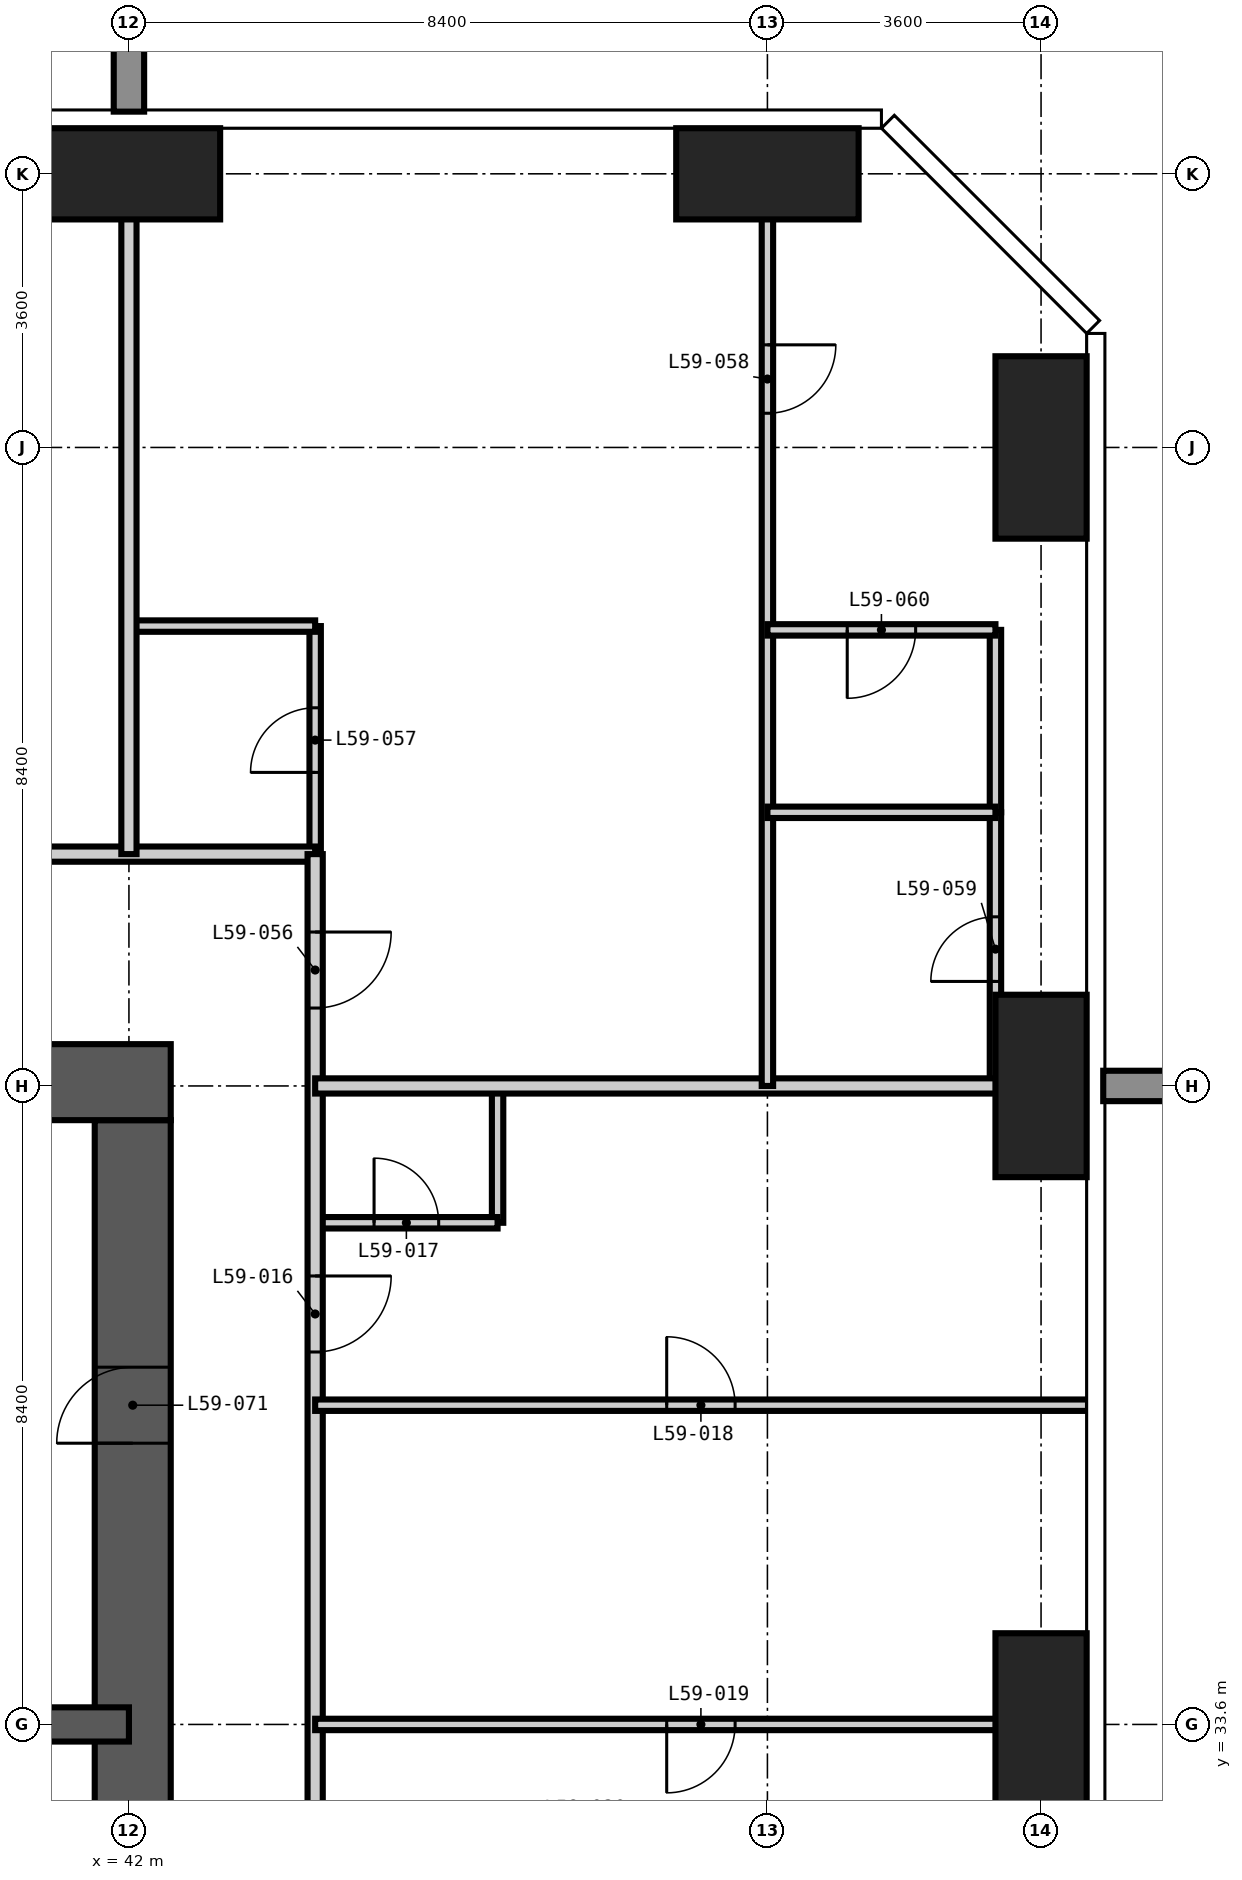
"""IFC4 building model, lengths in metres.
Left out: names, types, materials, properties, quantities, classifications, styles, units other than length and angle.
Written with IfcOpenShell. Run it as: python <this file> out.ifc"""

import sys

from ifc_helpers import new_model, si_unit, direction, frame, frame_2d, origin, origin_2d, place, context, subcontext, project, spatial, rectangle, extrude, element, fill, save


model = new_model("IFC4")
c1 = context("Model", 3, precision=1e-05, world=origin(), true_north=direction((0.0, 1.0)))
c2 = subcontext(c1, "Body", "Model", "MODEL_VIEW")
j1 = project(units=[si_unit("LENGTHUNIT", "METRE"), si_unit("PLANEANGLEUNIT", "RADIAN")], contexts=[c1])
p1 = place(None, origin())
s1 = spatial("IfcSite", under=j1, at=p1, CompositionType="ELEMENT")
p2 = place(p1, origin())
s2 = spatial("IfcBuilding", under=s1, at=p2, CompositionType="ELEMENT")
p3 = place(p2, frame((0.0, 0.0, 229.5)))
s3 = spatial("IfcBuildingStorey", under=s2, at=p3, CompositionType="ELEMENT", Elevation=229.5)
for number, where, z_axis, x_axis in (
    (1, (42.0, 54.0, -0.35), (0.0, 0.0, 1.0), (1.0, 0.0, 0.0)),
    (2, (50.4, 54.0, -0.35), (0.0, 0.0, 1.0), (1.0, 0.0, 0.0)),
):
    element("IfcColumn", number, at=place(p3, frame(where, z_axis=z_axis, x_axis=x_axis)), inside=s3, PredefinedType="COLUMN", context=c2, shape_type="SweptSolid", body=[
        extrude(rectangle(XDim=2.4, YDim=1.2, at=origin_2d()), origin(), (0.0, 0.0, 1.0), 3.9),
    ])
for number, where, z_axis, x_axis in (
    (3, (54.0, 33.6, -0.35), (0.0, 0.0, 1.0), (1.0, 0.0, 0.0)),
    (4, (54.0, 42.0, -0.35), (0.0, 0.0, 1.0), (1.0, 0.0, 0.0)),
    (5, (54.0, 50.4, -0.35), (0.0, 0.0, 1.0), (1.0, 0.0, 0.0)),
):
    element("IfcColumn", number, at=place(p3, frame(where, z_axis=z_axis, x_axis=x_axis)), inside=s3, PredefinedType="COLUMN", context=c2, shape_type="SweptSolid", body=[
        extrude(rectangle(XDim=1.2, YDim=2.4, at=origin_2d()), origin(), (0.0, 0.0, 1.0), 3.9),
    ])
p4 = place(p3, frame((42.05, 17.25, -0.35), z_axis=(0.0, 0.0, 1.0), x_axis=(0.0, 1.0, 0.0)))
e6 = element("IfcWall", 6, at=p4, inside=s3, PredefinedType="SHEAR", context=c2, shape_type="SweptSolid", body=[
    extrude(rectangle(XDim=24.3, YDim=1.0, at=frame_2d((12.15, 0.0))), origin(), (0.0, 0.0, 1.0), 3.9),
])
p5 = place(p4, frame((0.35, 0.0, 0.35)))
e7 = element("IfcOpeningElement", 7, at=p5, cuts=e6, PredefinedType="OPENING", context=c2, shape_type="SweptSolid", body=[
    extrude(rectangle(XDim=1.2, YDim=2.2, at=frame_2d((0.6, 1.1))), frame((0.0, 0.51, 0.0), z_axis=(0.0, -1.0, 0.0), x_axis=(1.0, 0.0, 0.0)), (0.0, 0.0, 1.0), 1.02),
])
p6 = place(p4, frame((11.25, 0.0, 0.35)))
e8 = element("IfcOpeningElement", 8, at=p6, cuts=e6, PredefinedType="OPENING", context=c2, shape_type="SweptSolid", body=[
    extrude(rectangle(XDim=1.8, YDim=2.2, at=frame_2d((0.9, 1.1))), frame((0.0, 0.51, 0.0), z_axis=(0.0, -1.0, 0.0), x_axis=(1.0, 0.0, 0.0)), (0.0, 0.0, 1.0), 1.02),
])
p7 = place(p4, frame((20.05, 0.0, 0.35)))
e9 = element("IfcOpeningElement", 9, at=p7, cuts=e6, PredefinedType="OPENING", context=c2, shape_type="SweptSolid", body=[
    extrude(rectangle(XDim=1.0, YDim=2.1, at=frame_2d((0.5, 1.05))), frame((0.0, 0.51, 0.0), z_axis=(0.0, -1.0, 0.0), x_axis=(1.0, 0.0, 0.0)), (0.0, 0.0, 1.0), 1.02),
])
p8 = place(p3, frame((42.55, 42.05, -0.35), z_axis=(0.0, 0.0, 1.0), x_axis=(-1.0, 0.0, 0.0)))
e10 = element("IfcWall", 10, at=p8, inside=s3, PredefinedType="SHEAR", context=c2, shape_type="SweptSolid", body=[
    extrude(rectangle(XDim=18.125, YDim=1.0, at=frame_2d((9.062, 0.0))), origin(), (0.0, 0.0, 1.0), 3.9),
])
p9 = place(p8, frame((10.45, 0.0, 0.35)))
e11 = element("IfcOpeningElement", 11, at=p9, cuts=e10, PredefinedType="OPENING", context=c2, shape_type="SweptSolid", body=[
    extrude(rectangle(XDim=1.2, YDim=2.2, at=frame_2d((0.6, 1.1))), frame((0.0, 0.51, 0.0), z_axis=(0.0, -1.0, 0.0), x_axis=(1.0, 0.0, 0.0)), (0.0, 0.0, 1.0), 1.02),
])
p10 = place(p3, frame((25.2, 33.6, -0.35), z_axis=(0.0, 0.0, 1.0), x_axis=(1.0, 0.0, 0.0)))
e12 = element("IfcWall", 12, at=p10, inside=s3, PredefinedType="SHEAR", context=c2, shape_type="SweptSolid", body=[
    extrude(rectangle(XDim=16.8, YDim=0.45, at=frame_2d((8.4, 0.0))), origin(), (0.0, 0.0, 1.0), 3.9),
])
p11 = place(p3, frame((44.45, 45.05, 0.0), z_axis=(0.0, 0.0, 1.0), x_axis=(0.0, 1.0, 0.0)))
e13 = element("IfcWall", 13, at=p11, inside=s3, PredefinedType="PARTITIONING", context=c2, shape_type="SweptSolid", body=[
    extrude(rectangle(XDim=3.0, YDim=0.15, at=frame_2d((1.5, 0.0))), origin(), (0.0, 0.0, 1.0), 3.55),
])
p12 = place(p11, frame((1.075, 0.0, 0.0)))
e14 = element("IfcOpeningElement", 14, at=p12, cuts=e13, PredefinedType="OPENING", context=c2, shape_type="SweptSolid", body=[
    extrude(rectangle(XDim=0.85, YDim=2.1, at=frame_2d((0.425, 1.05))), frame((0.0, 0.085, 0.0), z_axis=(0.0, -1.0, 0.0), x_axis=(1.0, 0.0, 0.0)), (0.0, 0.0, 1.0), 0.17),
])
p13 = place(p3, frame((46.85, 40.2, 0.0), z_axis=(0.0, 0.0, 1.0), x_axis=(0.0, 1.0, 0.0)))
e15 = element("IfcWall", 15, at=p13, inside=s3, PredefinedType="PARTITIONING", context=c2, shape_type="SweptSolid", body=[
    extrude(rectangle(XDim=1.8, YDim=0.15, at=frame_2d((0.9, 0.0))), origin(), (0.0, 0.0, 1.0), 3.55),
])
p14 = place(p3, frame((53.4, 42.0, 0.0), z_axis=(0.0, 0.0, 1.0), x_axis=(0.0, 1.0, 0.0)))
e16 = element("IfcWall", 16, at=p14, inside=s3, PredefinedType="PARTITIONING", context=c2, shape_type="SweptSolid", body=[
    extrude(rectangle(XDim=3.6, YDim=0.15, at=frame_2d((1.8, 0.0))), origin(), (0.0, 0.0, 1.0), 3.55),
])
p15 = place(p14, frame((1.375, 0.0, 0.0)))
e17 = element("IfcOpeningElement", 17, at=p15, cuts=e16, PredefinedType="OPENING", context=c2, shape_type="SweptSolid", body=[
    extrude(rectangle(XDim=0.85, YDim=2.1, at=frame_2d((0.425, 1.05))), frame((0.0, 0.085, 0.0), z_axis=(0.0, -1.0, 0.0), x_axis=(1.0, 0.0, 0.0)), (0.0, 0.0, 1.0), 0.17),
])
p16 = place(p3, frame((44.45, 40.2, 0.0), z_axis=(0.0, 0.0, 1.0), x_axis=(1.0, 0.0, 0.0)))
e18 = element("IfcWall", 18, at=p16, inside=s3, PredefinedType="PARTITIONING", context=c2, shape_type="SweptSolid", body=[
    extrude(rectangle(XDim=2.4, YDim=0.15, at=frame_2d((1.2, 0.0))), origin(), (0.0, 0.0, 1.0), 3.55),
])
p17 = place(p16, frame((0.775, 0.0, 0.0)))
e19 = element("IfcOpeningElement", 19, at=p17, cuts=e18, PredefinedType="OPENING", context=c2, shape_type="SweptSolid", body=[
    extrude(rectangle(XDim=0.85, YDim=2.1, at=frame_2d((0.425, 1.05))), frame((0.0, 0.085, 0.0), z_axis=(0.0, -1.0, 0.0), x_axis=(1.0, 0.0, 0.0)), (0.0, 0.0, 1.0), 0.17),
])
p18 = place(p3, frame((42.0, 48.05, 0.0), z_axis=(0.0, 0.0, 1.0), x_axis=(1.0, 0.0, 0.0)))
e20 = element("IfcWall", 20, at=p18, inside=s3, PredefinedType="PARTITIONING", context=c2, shape_type="SweptSolid", body=[
    extrude(rectangle(XDim=2.45, YDim=0.15, at=frame_2d((1.225, 0.0))), origin(), (0.0, 0.0, 1.0), 3.55),
])
p19 = place(p3, frame((21.325, 45.05, 0.0), z_axis=(0.0, 0.0, 1.0), x_axis=(1.0, 0.0, 0.0)))
e21 = element("IfcWall", 21, at=p19, inside=s3, PredefinedType="PARTITIONING", context=c2, shape_type="SweptSolid", body=[
    extrude(rectangle(XDim=23.125, YDim=0.2, at=frame_2d((11.562, 0.0))), origin(), (0.0, 0.0, 1.0), 3.55),
])
p20 = place(p19, frame((5.475, 0.0, 0.0)))
e22 = element("IfcOpeningElement", 22, at=p20, cuts=e21, PredefinedType="OPENING", context=c2, shape_type="SweptSolid", body=[
    extrude(rectangle(XDim=1.0, YDim=2.2, at=frame_2d((0.5, 1.1))), frame((0.0, 0.11, 0.0), z_axis=(0.0, -1.0, 0.0), x_axis=(1.0, 0.0, 0.0)), (0.0, 0.0, 1.0), 0.22),
])
p21 = place(p19, frame((11.775, 0.0, 0.0)))
e23 = element("IfcOpeningElement", 23, at=p21, cuts=e21, PredefinedType="OPENING", context=c2, shape_type="SweptSolid", body=[
    extrude(rectangle(XDim=1.0, YDim=2.2, at=frame_2d((0.5, 1.1))), frame((0.0, 0.11, 0.0), z_axis=(0.0, -1.0, 0.0), x_axis=(1.0, 0.0, 0.0)), (0.0, 0.0, 1.0), 0.22),
])
p22 = place(p19, frame((18.075, 0.0, 0.0)))
e24 = element("IfcOpeningElement", 24, at=p22, cuts=e21, PredefinedType="OPENING", context=c2, shape_type="SweptSolid", body=[
    extrude(rectangle(XDim=1.0, YDim=2.2, at=frame_2d((0.5, 1.1))), frame((0.0, 0.11, 0.0), z_axis=(0.0, -1.0, 0.0), x_axis=(1.0, 0.0, 0.0)), (0.0, 0.0, 1.0), 0.22),
])
p23 = place(p3, frame((44.45, 45.05, 0.0), z_axis=(0.0, 0.0, 1.0), x_axis=(0.0, -1.0, 0.0)))
e25 = element("IfcWall", 25, at=p23, inside=s3, PredefinedType="PARTITIONING", context=c2, shape_type="SweptSolid", body=[
    extrude(rectangle(XDim=15.65, YDim=0.2, at=frame_2d((7.825, 0.0))), origin(), (0.0, 0.0, 1.0), 3.55),
])
p24 = place(p23, frame((5.55, 0.0, 0.0)))
e26 = element("IfcOpeningElement", 26, at=p24, cuts=e25, PredefinedType="OPENING", context=c2, shape_type="SweptSolid", body=[
    extrude(rectangle(XDim=1.0, YDim=2.2, at=frame_2d((0.5, 1.1))), frame((0.0, 0.11, 0.0), z_axis=(0.0, -1.0, 0.0), x_axis=(1.0, 0.0, 0.0)), (0.0, 0.0, 1.0), 0.22),
])
p25 = place(p23, frame((1.025, 0.0, 0.0)))
e27 = element("IfcOpeningElement", 27, at=p25, cuts=e25, PredefinedType="OPENING", context=c2, shape_type="SweptSolid", body=[
    extrude(rectangle(XDim=1.0, YDim=2.2, at=frame_2d((0.5, 1.1))), frame((0.0, 0.11, 0.0), z_axis=(0.0, -1.0, 0.0), x_axis=(1.0, 0.0, 0.0)), (0.0, 0.0, 1.0), 0.22),
])
p26 = place(p3, frame((42.0, 45.05, 0.0), z_axis=(0.0, 0.0, 1.0), x_axis=(0.0, 1.0, 0.0)))
e28 = element("IfcWall", 28, at=p26, inside=s3, PredefinedType="PARTITIONING", context=c2, shape_type="SweptSolid", body=[
    extrude(rectangle(XDim=9.568, YDim=0.2, at=frame_2d((4.784, 0.0))), origin(), (0.0, 0.0, 1.0), 3.55),
])
p27 = place(p3, frame((44.45, 42.0, 0.0), z_axis=(0.0, 0.0, 1.0), x_axis=(1.0, 0.0, 0.0)))
e29 = element("IfcWall", 29, at=p27, inside=s3, PredefinedType="PARTITIONING", context=c2, shape_type="SweptSolid", body=[
    extrude(rectangle(XDim=10.168, YDim=0.2, at=frame_2d((5.084, 0.0))), origin(), (0.0, 0.0, 1.0), 3.55),
])
p28 = place(p3, frame((50.4, 42.0, 0.0), z_axis=(0.0, 0.0, 1.0), x_axis=(0.0, 1.0, 0.0)))
e30 = element("IfcWall", 30, at=p28, inside=s3, PredefinedType="PARTITIONING", context=c2, shape_type="SweptSolid", body=[
    extrude(rectangle(XDim=12.618, YDim=0.15, at=frame_2d((6.309, 0.0))), origin(), (0.0, 0.0, 1.0), 3.55),
])
p29 = place(p28, frame((8.85, 0.0, 0.0)))
e31 = element("IfcOpeningElement", 31, at=p29, cuts=e30, PredefinedType="OPENING", context=c2, shape_type="SweptSolid", body=[
    extrude(rectangle(XDim=0.9, YDim=2.1, at=frame_2d((0.45, 1.05))), frame((0.0, 0.085, 0.0), z_axis=(0.0, -1.0, 0.0), x_axis=(1.0, 0.0, 0.0)), (0.0, 0.0, 1.0), 0.17),
])
p30 = place(p3, frame((53.4, 45.6, 0.0), z_axis=(0.0, 0.0, 1.0), x_axis=(0.0, 1.0, 0.0)))
e32 = element("IfcWall", 32, at=p30, inside=s3, PredefinedType="PARTITIONING", context=c2, shape_type="SweptSolid", body=[
    extrude(rectangle(XDim=2.4, YDim=0.15, at=frame_2d((1.2, 0.0))), origin(), (0.0, 0.0, 1.0), 3.55),
])
p31 = place(p3, frame((44.45, 33.6, 0.0), z_axis=(0.0, 0.0, 1.0), x_axis=(1.0, 0.0, 0.0)))
e33 = element("IfcWall", 33, at=p31, inside=s3, PredefinedType="PARTITIONING", context=c2, shape_type="SweptSolid", body=[
    extrude(rectangle(XDim=10.168, YDim=0.15, at=frame_2d((5.084, 0.0))), origin(), (0.0, 0.0, 1.0), 3.55),
])
p32 = place(p31, frame((4.625, 0.0, 0.0)))
e34 = element("IfcOpeningElement", 34, at=p32, cuts=e33, PredefinedType="OPENING", context=c2, shape_type="SweptSolid", body=[
    extrude(rectangle(XDim=0.9, YDim=2.1, at=frame_2d((0.45, 1.05))), frame((0.0, 0.085, 0.0), z_axis=(0.0, -1.0, 0.0), x_axis=(1.0, 0.0, 0.0)), (0.0, 0.0, 1.0), 0.17),
])
p33 = place(p3, frame((44.45, 37.8, 0.0), z_axis=(0.0, 0.0, 1.0), x_axis=(1.0, 0.0, 0.0)))
e35 = element("IfcWall", 35, at=p33, inside=s3, PredefinedType="PARTITIONING", context=c2, shape_type="SweptSolid", body=[
    extrude(rectangle(XDim=10.168, YDim=0.15, at=frame_2d((5.084, 0.0))), origin(), (0.0, 0.0, 1.0), 3.55),
])
p34 = place(p33, frame((4.625, 0.0, 0.0)))
e36 = element("IfcOpeningElement", 36, at=p34, cuts=e35, PredefinedType="OPENING", context=c2, shape_type="SweptSolid", body=[
    extrude(rectangle(XDim=0.9, YDim=2.1, at=frame_2d((0.45, 1.05))), frame((0.0, 0.085, 0.0), z_axis=(0.0, -1.0, 0.0), x_axis=(1.0, 0.0, 0.0)), (0.0, 0.0, 1.0), 0.17),
])
p35 = place(p3, frame((50.4, 45.6, 0.0), z_axis=(0.0, 0.0, 1.0), x_axis=(1.0, 0.0, 0.0)))
e37 = element("IfcWall", 37, at=p35, inside=s3, PredefinedType="PARTITIONING", context=c2, shape_type="SweptSolid", body=[
    extrude(rectangle(XDim=3.0, YDim=0.15, at=frame_2d((1.5, 0.0))), origin(), (0.0, 0.0, 1.0), 3.55),
])
p36 = place(p3, frame((50.4, 48.0, 0.0), z_axis=(0.0, 0.0, 1.0), x_axis=(1.0, 0.0, 0.0)))
e38 = element("IfcWall", 38, at=p36, inside=s3, PredefinedType="PARTITIONING", context=c2, shape_type="SweptSolid", body=[
    extrude(rectangle(XDim=3.0, YDim=0.15, at=frame_2d((1.5, 0.0))), origin(), (0.0, 0.0, 1.0), 3.55),
])
p37 = place(p36, frame((1.05, 0.0, 0.0)))
e39 = element("IfcOpeningElement", 39, at=p37, cuts=e38, PredefinedType="OPENING", context=c2, shape_type="SweptSolid", body=[
    extrude(rectangle(XDim=0.9, YDim=2.1, at=frame_2d((0.45, 1.05))), frame((0.0, 0.085, 0.0), z_axis=(0.0, -1.0, 0.0), x_axis=(1.0, 0.0, 0.0)), (0.0, 0.0, 1.0), 0.17),
])
p38 = place(p24, origin())
e40 = element("IfcDoor", 40, at=p38, inside=s3, OperationType="SINGLE_SWING_LEFT", PredefinedType="DOOR", context=c2, shape_type="SweptSolid", body=[
    extrude(rectangle(XDim=1.0, YDim=2.2, at=frame_2d((0.5, 1.1))), frame((0.0, 0.025, 0.0), z_axis=(0.0, -1.0, 0.0), x_axis=(1.0, 0.0, 0.0)), (0.0, 0.0, 1.0), 0.05),
])
fill(e26, e40)
p39 = place(p17, origin())
e41 = element("IfcDoor", 41, at=p39, inside=s3, OperationType="SINGLE_SWING_LEFT", PredefinedType="DOOR", context=c2, shape_type="SweptSolid", body=[
    extrude(rectangle(XDim=0.85, YDim=2.1, at=frame_2d((0.425, 1.05))), frame((0.0, 0.025, 0.0), z_axis=(0.0, -1.0, 0.0), x_axis=(1.0, 0.0, 0.0)), (0.0, 0.0, 1.0), 0.05),
])
fill(e19, e41)
p40 = place(p34, origin())
e42 = element("IfcDoor", 42, at=p40, inside=s3, OperationType="SINGLE_SWING_LEFT", PredefinedType="DOOR", context=c2, shape_type="SweptSolid", body=[
    extrude(rectangle(XDim=0.9, YDim=2.1, at=frame_2d((0.45, 1.05))), frame((0.0, 0.025, 0.0), z_axis=(0.0, -1.0, 0.0), x_axis=(1.0, 0.0, 0.0)), (0.0, 0.0, 1.0), 0.05),
])
fill(e36, e42)
p41 = place(p32, frame((0.9, 0.0, 0.0), z_axis=(0.0, 0.0, 1.0), x_axis=(-1.0, 0.0, 0.0)))
e43 = element("IfcDoor", 43, at=p41, inside=s3, OperationType="SINGLE_SWING_RIGHT", PredefinedType="DOOR", context=c2, shape_type="SweptSolid", body=[
    extrude(rectangle(XDim=0.9, YDim=2.1, at=frame_2d((0.45, 1.05))), frame((0.0, 0.025, 0.0), z_axis=(0.0, -1.0, 0.0), x_axis=(1.0, 0.0, 0.0)), (0.0, 0.0, 1.0), 0.05),
])
fill(e34, e43)
p42 = place(p25, origin())
e44 = element("IfcDoor", 44, at=p42, inside=s3, OperationType="SINGLE_SWING_LEFT", PredefinedType="DOOR", context=c2, shape_type="SweptSolid", body=[
    extrude(rectangle(XDim=1.0, YDim=2.2, at=frame_2d((0.5, 1.1))), frame((0.0, 0.025, 0.0), z_axis=(0.0, -1.0, 0.0), x_axis=(1.0, 0.0, 0.0)), (0.0, 0.0, 1.0), 0.05),
])
fill(e27, e44)
p43 = place(p12, origin())
e45 = element("IfcDoor", 45, at=p43, inside=s3, OperationType="SINGLE_SWING_LEFT", PredefinedType="DOOR", context=c2, shape_type="SweptSolid", body=[
    extrude(rectangle(XDim=0.85, YDim=2.1, at=frame_2d((0.425, 1.05))), frame((0.0, 0.025, 0.0), z_axis=(0.0, -1.0, 0.0), x_axis=(1.0, 0.0, 0.0)), (0.0, 0.0, 1.0), 0.05),
])
fill(e14, e45)
p44 = place(p29, frame((0.9, 0.0, 0.0), z_axis=(0.0, 0.0, 1.0), x_axis=(-1.0, 0.0, 0.0)))
e46 = element("IfcDoor", 46, at=p44, inside=s3, OperationType="SINGLE_SWING_LEFT", PredefinedType="DOOR", context=c2, shape_type="SweptSolid", body=[
    extrude(rectangle(XDim=0.9, YDim=2.1, at=frame_2d((0.45, 1.05))), frame((0.0, 0.025, 0.0), z_axis=(0.0, -1.0, 0.0), x_axis=(1.0, 0.0, 0.0)), (0.0, 0.0, 1.0), 0.05),
])
fill(e31, e46)
p45 = place(p15, origin())
e47 = element("IfcDoor", 47, at=p45, inside=s3, OperationType="SINGLE_SWING_LEFT", PredefinedType="DOOR", context=c2, shape_type="SweptSolid", body=[
    extrude(rectangle(XDim=0.85, YDim=2.1, at=frame_2d((0.425, 1.05))), frame((0.0, 0.025, 0.0), z_axis=(0.0, -1.0, 0.0), x_axis=(1.0, 0.0, 0.0)), (0.0, 0.0, 1.0), 0.05),
])
fill(e17, e47)
p46 = place(p37, frame((0.9, 0.0, 0.0), z_axis=(0.0, 0.0, 1.0), x_axis=(-1.0, 0.0, 0.0)))
e48 = element("IfcDoor", 48, at=p46, inside=s3, OperationType="SINGLE_SWING_RIGHT", PredefinedType="DOOR", context=c2, shape_type="SweptSolid", body=[
    extrude(rectangle(XDim=0.9, YDim=2.1, at=frame_2d((0.45, 1.05))), frame((0.0, 0.025, 0.0), z_axis=(0.0, -1.0, 0.0), x_axis=(1.0, 0.0, 0.0)), (0.0, 0.0, 1.0), 0.05),
])
fill(e39, e48)
p47 = place(p7, origin())
e49 = element("IfcDoor", 49, at=p47, inside=s3, OperationType="SINGLE_SWING_LEFT", PredefinedType="DOOR", context=c2, shape_type="SweptSolid", body=[
    extrude(rectangle(XDim=1.0, YDim=2.1, at=frame_2d((0.5, 1.05))), frame((0.0, 0.025, 0.0), z_axis=(0.0, -1.0, 0.0), x_axis=(1.0, 0.0, 0.0)), (0.0, 0.0, 1.0), 0.05),
])
fill(e9, e49)
save(model, sys.argv[1])
